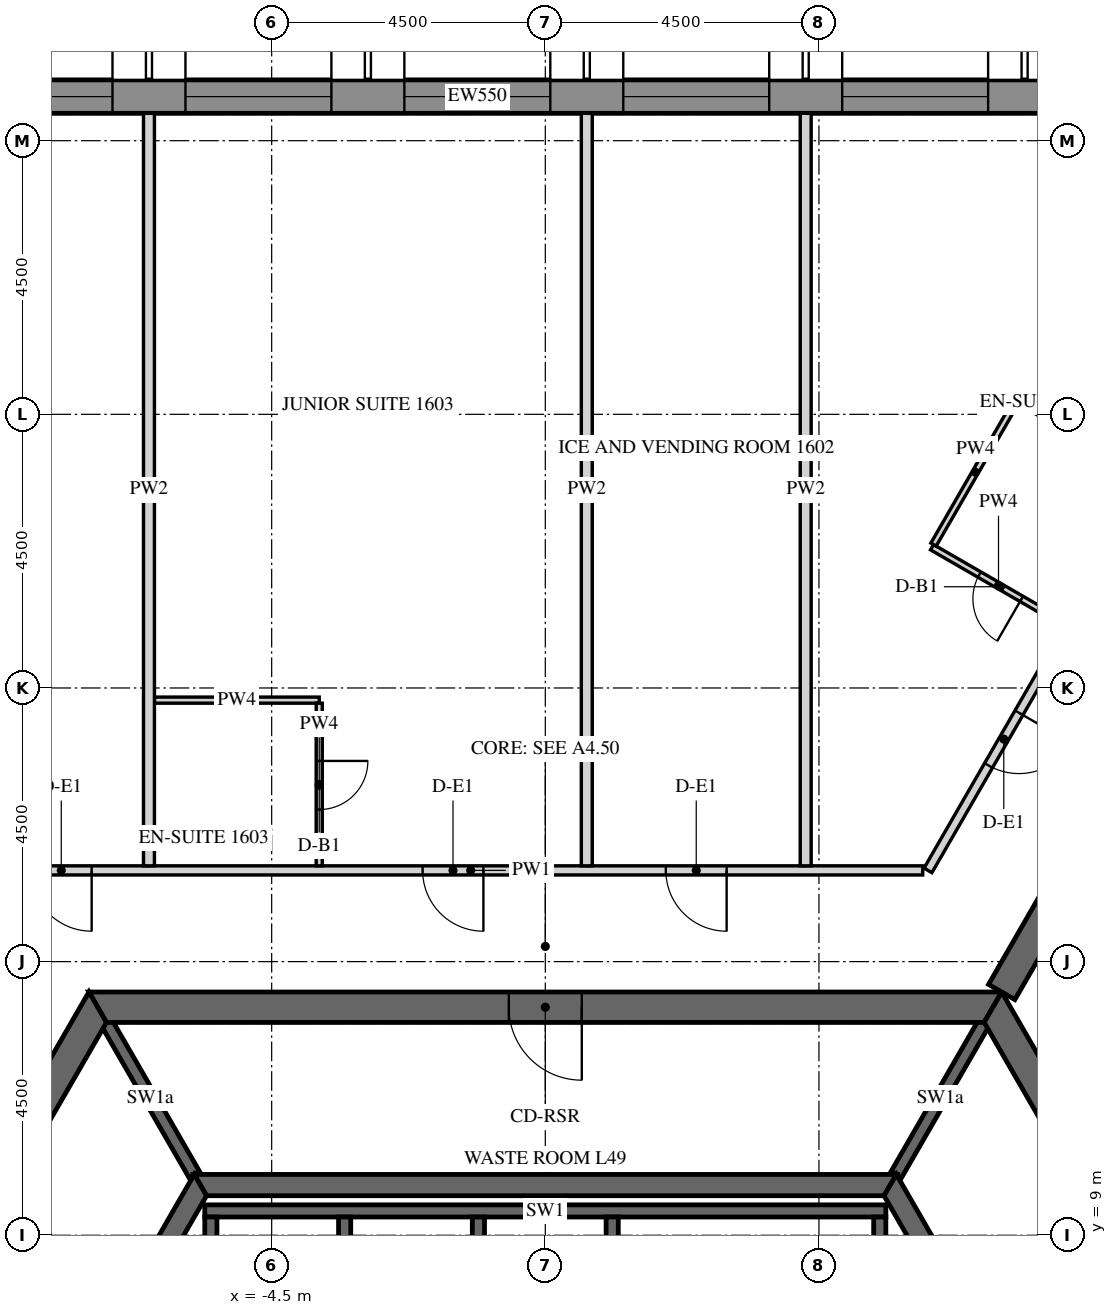
"""IFC4 building model, lengths in metres.
Left out: names, types, materials, properties, quantities, classifications, styles, units other than length and angle.
Written with IfcOpenShell. Run it as: python <this file> out.ifc"""

import sys

from ifc_helpers import new_model, si_unit, direction, frame, frame_2d, origin, place, context, subcontext, project, spatial, polyline, rectangle, outline, extrude, element, fill, save


model = new_model("IFC4")
c1 = context("Model", 3, precision=1e-05, world=origin(), true_north=direction((0.0, 1.0)))
c2 = subcontext(c1, "Body", "Model", "MODEL_VIEW")
j1 = project(units=[si_unit("LENGTHUNIT", "METRE"), si_unit("PLANEANGLEUNIT", "RADIAN")], contexts=[c1])
p1 = place(None, origin())
s1 = spatial("IfcSite", under=j1, at=p1, CompositionType="ELEMENT")
p2 = place(p1, origin())
s2 = spatial("IfcBuilding", under=s1, at=p2, CompositionType="ELEMENT")
p3 = place(p2, frame((0.0, 0.0, 207.3)))
s3 = spatial("IfcBuildingStorey", under=s2, at=p3, CompositionType="ELEMENT", Elevation=207.3)
p4 = place(p3, frame((12.761, 27.725, -0.15), z_axis=(0.0, 0.0, 1.0), x_axis=(-1.0, 0.0, 0.0)))
e1 = element("IfcWall", 1, at=p4, inside=s3, PredefinedType="SOLIDWALL", context=c2, shape_type="SweptSolid", body=[
    extrude(outline(polyline([(-0.022, -0.275), (27.783, -0.275), (27.732, 0.275), (0.022, 0.275), (-0.022, -0.275)])), origin(), (0.0, 0.0, 1.0), 3.9),
])
p5 = place(p4, frame((1.879, 0.0, 1.05)))
e2 = element("IfcOpeningElement", 2, at=p5, cuts=e1, PredefinedType="OPENING", context=c2, shape_type="SweptSolid", body=[
    extrude(rectangle(XDim=2.4, YDim=2.4, at=frame_2d((1.2, 1.2))), frame((0.0, 0.285, 0.0), z_axis=(0.0, -1.0, 0.0), x_axis=(1.0, 0.0, 0.0)), (0.0, 0.0, 1.0), 0.57),
])
p6 = place(p4, frame((5.479, 0.0, 1.05)))
e3 = element("IfcOpeningElement", 3, at=p6, cuts=e1, PredefinedType="OPENING", context=c2, shape_type="SweptSolid", body=[
    extrude(rectangle(XDim=2.4, YDim=2.4, at=frame_2d((1.2, 1.2))), frame((0.0, 0.285, 0.0), z_axis=(0.0, -1.0, 0.0), x_axis=(1.0, 0.0, 0.0)), (0.0, 0.0, 1.0), 0.57),
])
p7 = place(p4, frame((9.079, 0.0, 1.05)))
e4 = element("IfcOpeningElement", 4, at=p7, cuts=e1, PredefinedType="OPENING", context=c2, shape_type="SweptSolid", body=[
    extrude(rectangle(XDim=2.4, YDim=2.4, at=frame_2d((1.2, 1.2))), frame((0.0, 0.285, 0.0), z_axis=(0.0, -1.0, 0.0), x_axis=(1.0, 0.0, 0.0)), (0.0, 0.0, 1.0), 0.57),
])
p8 = place(p4, frame((12.679, 0.0, 1.05)))
e5 = element("IfcOpeningElement", 5, at=p8, cuts=e1, PredefinedType="OPENING", context=c2, shape_type="SweptSolid", body=[
    extrude(rectangle(XDim=2.4, YDim=2.4, at=frame_2d((1.2, 1.2))), frame((0.0, 0.285, 0.0), z_axis=(0.0, -1.0, 0.0), x_axis=(1.0, 0.0, 0.0)), (0.0, 0.0, 1.0), 0.57),
])
p9 = place(p4, frame((16.279, 0.0, 1.05)))
e6 = element("IfcOpeningElement", 6, at=p9, cuts=e1, PredefinedType="OPENING", context=c2, shape_type="SweptSolid", body=[
    extrude(rectangle(XDim=2.4, YDim=2.4, at=frame_2d((1.2, 1.2))), frame((0.0, 0.285, 0.0), z_axis=(0.0, -1.0, 0.0), x_axis=(1.0, 0.0, 0.0)), (0.0, 0.0, 1.0), 0.57),
])
p10 = place(p4, frame((19.879, 0.0, 1.05)))
e7 = element("IfcOpeningElement", 7, at=p10, cuts=e1, PredefinedType="OPENING", context=c2, shape_type="SweptSolid", body=[
    extrude(rectangle(XDim=2.4, YDim=2.4, at=frame_2d((1.2, 1.2))), frame((0.0, 0.285, 0.0), z_axis=(0.0, -1.0, 0.0), x_axis=(1.0, 0.0, 0.0)), (0.0, 0.0, 1.0), 0.57),
])
p11 = place(p4, frame((23.479, 0.0, 1.05)))
e8 = element("IfcOpeningElement", 8, at=p11, cuts=e1, PredefinedType="OPENING", context=c2, shape_type="SweptSolid", body=[
    extrude(rectangle(XDim=2.4, YDim=2.4, at=frame_2d((1.2, 1.2))), frame((0.0, 0.285, 0.0), z_axis=(0.0, -1.0, 0.0), x_axis=(1.0, 0.0, 0.0)), (0.0, 0.0, 1.0), 0.57),
])
p12 = place(p3, frame((-7.361, 12.75, -0.15), z_axis=(0.0, 0.0, 1.0), x_axis=(-0.50000571537, -0.866022103989, 0.0)))
e9 = element("IfcWall", 9, at=p12, inside=s3, PredefinedType="SHEAR", context=c2, shape_type="SweptSolid", body=[
    extrude(outline(polyline([(-0.144, -0.25), (14.867, -0.25), (14.578, 0.25), (0.144, 0.25), (-0.144, -0.25)])), origin(), (0.0, 0.0, 1.0), 3.9),
])
p13 = place(p12, frame((6.49, 0.0, 0.15)))
e10 = element("IfcOpeningElement", 10, at=p13, cuts=e9, PredefinedType="OPENING", context=c2, shape_type="SweptSolid", body=[
    extrude(rectangle(XDim=1.8, YDim=2.4, at=frame_2d((0.9, 1.2))), frame((0.0, 0.26, 0.0), z_axis=(0.0, -1.0, 0.0), x_axis=(1.0, 0.0, 0.0)), (0.0, 0.0, 1.0), 0.52),
])
p14 = place(p3, frame((14.722, 0.0, -0.15), z_axis=(0.0, 0.0, 1.0), x_axis=(-0.50000571537, 0.866022103989, 0.0)))
e11 = element("IfcWall", 11, at=p14, inside=s3, PredefinedType="SHEAR", context=c2, shape_type="SweptSolid", body=[
    extrude(outline(polyline([(-0.144, -0.25), (14.867, -0.25), (14.578, 0.25), (0.144, 0.25), (-0.144, -0.25)])), origin(), (0.0, 0.0, 1.0), 3.9),
])
p15 = place(p14, frame((6.432, 0.0, 0.15)))
e12 = element("IfcOpeningElement", 12, at=p15, cuts=e11, PredefinedType="OPENING", context=c2, shape_type="SweptSolid", body=[
    extrude(rectangle(XDim=1.8, YDim=2.4, at=frame_2d((0.9, 1.2))), frame((0.0, 0.26, 0.0), z_axis=(0.0, -1.0, 0.0), x_axis=(1.0, 0.0, 0.0)), (0.0, 0.0, 1.0), 0.52),
])
p16 = place(p3, frame((7.361, 12.75, -0.15), z_axis=(0.0, 0.0, 1.0), x_axis=(-1.0, 0.0, 0.0)))
e13 = element("IfcWall", 13, at=p16, inside=s3, PredefinedType="SHEAR", context=c2, shape_type="SweptSolid", body=[
    extrude(outline(polyline([(-0.144, -0.25), (14.866, -0.25), (14.578, 0.25), (0.144, 0.25), (-0.144, -0.25)])), origin(), (0.0, 0.0, 1.0), 3.9),
])
p17 = place(p16, frame((6.761, 0.0, 0.15)))
e14 = element("IfcOpeningElement", 14, at=p17, cuts=e13, PredefinedType="OPENING", context=c2, shape_type="SweptSolid", body=[
    extrude(rectangle(XDim=1.2, YDim=2.4, at=frame_2d((0.6, 1.2))), frame((0.0, 0.26, 0.0), z_axis=(0.0, -1.0, 0.0), x_axis=(1.0, 0.0, 0.0)), (0.0, 0.0, 1.0), 0.52),
])
p18 = place(p3, frame((7.506, 13.0, -0.15), z_axis=(0.0, 0.0, 1.0), x_axis=(0.499988271576, 0.866032175087, 0.0)))
e15 = element("IfcWall", 15, at=p18, inside=s3, PredefinedType="SHEAR", context=c2, shape_type="SweptSolid", body=[
    extrude(rectangle(XDim=15.424, YDim=0.5, at=frame_2d((7.712, 0.0))), origin(), (0.0, 0.0, 1.0), 3.9),
])
p19 = place(p18, frame((6.812, 0.0, 0.15)))
e16 = element("IfcOpeningElement", 16, at=p19, cuts=e15, PredefinedType="OPENING", context=c2, shape_type="SweptSolid", body=[
    extrude(rectangle(XDim=1.8, YDim=2.4, at=frame_2d((0.9, 1.2))), frame((0.0, 0.26, 0.0), z_axis=(0.0, -1.0, 0.0), x_axis=(1.0, 0.0, 0.0)), (0.0, 0.0, 1.0), 0.52),
])
p20 = place(p3, frame((-5.673, 9.825, -0.15), z_axis=(0.0, 0.0, 1.0), x_axis=(-0.499995046907, -0.866028263435, 0.0)))
e17 = element("IfcWall", 17, at=p20, inside=s3, PredefinedType="SHEAR", context=c2, shape_type="SweptSolid", body=[
    extrude(outline(polyline([(-0.101, -0.175), (11.446, -0.175), (11.244, 0.175), (0.101, 0.175), (-0.101, -0.175)])), origin(), (0.0, 0.0, 1.0), 3.9),
])
p21 = place(p20, frame((4.801, 0.0, 0.15)))
e18 = element("IfcOpeningElement", 18, at=p21, cuts=e17, PredefinedType="OPENING", context=c2, shape_type="SweptSolid", body=[
    extrude(rectangle(XDim=1.8, YDim=2.4, at=frame_2d((0.9, 1.2))), frame((0.0, 0.185, 0.0), z_axis=(0.0, -1.0, 0.0), x_axis=(1.0, 0.0, 0.0)), (0.0, 0.0, 1.0), 0.37),
])
p22 = place(p3, frame((11.345, 0.0, -0.15), z_axis=(0.0, 0.0, 1.0), x_axis=(-0.499995046907, 0.866028263435, 0.0)))
e19 = element("IfcWall", 19, at=p22, inside=s3, PredefinedType="SHEAR", context=c2, shape_type="SweptSolid", body=[
    extrude(outline(polyline([(-0.101, -0.175), (11.446, -0.175), (11.244, 0.175), (0.101, 0.175), (-0.101, -0.175)])), origin(), (0.0, 0.0, 1.0), 3.9),
])
p23 = place(p22, frame((4.744, 0.0, 0.15)))
e20 = element("IfcOpeningElement", 20, at=p23, cuts=e19, PredefinedType="OPENING", context=c2, shape_type="SweptSolid", body=[
    extrude(rectangle(XDim=1.8, YDim=2.4, at=frame_2d((0.9, 1.2))), frame((0.0, 0.185, 0.0), z_axis=(0.0, -1.0, 0.0), x_axis=(1.0, 0.0, 0.0)), (0.0, 0.0, 1.0), 0.37),
])
p24 = place(p3, frame((5.673, 9.825, -0.15), z_axis=(0.0, 0.0, 1.0), x_axis=(-1.0, 0.0, 0.0)))
e21 = element("IfcWall", 21, at=p24, inside=s3, PredefinedType="SHEAR", context=c2, shape_type="SweptSolid", body=[
    extrude(outline(polyline([(-0.101, -0.175), (11.446, -0.175), (11.244, 0.175), (0.101, 0.175), (-0.101, -0.175)])), origin(), (0.0, 0.0, 1.0), 3.9),
])
p25 = place(p3, frame((-5.6, 9.4, -0.25), z_axis=(0.0, 0.0, 1.0), x_axis=(1.0, 0.0, 0.0)))
e22 = element("IfcWall", 22, at=p25, inside=s3, PredefinedType="SHEAR", context=c2, shape_type="SweptSolid", body=[
    extrude(rectangle(XDim=11.2, YDim=0.2, at=frame_2d((5.6, 0.0))), origin(), (0.0, 0.0, 1.0), 3.9),
])
for number, where, z_axis, x_axis in (
    (23, (-5.5, 6.4, -0.25), (0.0, 0.0, 1.0), (0.0, 1.0, 0.0)),
    (24, (-3.3, 6.4, -0.25), (0.0, 0.0, 1.0), (0.0, 1.0, 0.0)),
    (25, (-1.1, 6.4, -0.25), (0.0, 0.0, 1.0), (0.0, 1.0, 0.0)),
    (26, (1.1, 6.4, -0.25), (0.0, 0.0, 1.0), (0.0, 1.0, 0.0)),
    (27, (5.5, 6.4, -0.25), (0.0, 0.0, 1.0), (0.0, 1.0, 0.0)),
):
    element("IfcWall", number, at=place(p3, frame(where, z_axis=z_axis, x_axis=x_axis)), inside=s3, PredefinedType="SHEAR", context=c2, shape_type="SweptSolid", body=[
        extrude(rectangle(XDim=2.9, YDim=0.2, at=frame_2d((1.45, 0.0))), origin(), (0.0, 0.0, 1.0), 3.9),
    ])
for number, where, z_axis, x_axis in (
    (28, (5.773, 10.0, -0.15), (0.0, 0.0, 1.0), (0.5, 0.866, 0.0)),
    (29, (-5.773, 10.0, -0.15), (0.0, 0.0, 1.0), (-0.5, 0.866, 0.0)),
):
    element("IfcWall", number, at=place(p3, frame(where, z_axis=z_axis, x_axis=x_axis)), inside=s3, PredefinedType="SHEAR", context=c2, shape_type="SweptSolid", body=[
        extrude(rectangle(XDim=2.887, YDim=0.2, at=frame_2d((1.443, 0.0))), origin(), (0.0, 0.0, 1.0), 3.9),
    ])
p26 = place(p3, frame((10.149, 21.678, 0.0), z_axis=(0.0, 0.0, 1.0), x_axis=(-0.499993780622, -0.866028994514, 0.0)))
e30 = element("IfcWall", 30, at=p26, inside=s3, PredefinedType="PARTITIONING", context=c2, shape_type="SweptSolid", body=[
    extrude(rectangle(XDim=7.711, YDim=0.15, at=frame_2d((3.855, 0.0))), origin(), (0.0, 0.0, 1.0), 2.988),
])
p27 = place(p26, frame((4.718, 0.0, 0.0)))
e31 = element("IfcOpeningElement", 31, at=p27, cuts=e30, PredefinedType="OPENING", context=c2, shape_type="SweptSolid", body=[
    extrude(rectangle(XDim=1.0, YDim=2.1, at=frame_2d((0.5, 1.05))), frame((0.0, 0.085, 0.0), z_axis=(0.0, -1.0, 0.0), x_axis=(1.0, 0.0, 0.0)), (0.0, 0.0, 1.0), 0.17),
])
p28 = place(p3, frame((6.207, 15.0, 0.0), z_axis=(0.0, 0.0, 1.0), x_axis=(-1.0, 0.0, 0.0)))
e32 = element("IfcWall", 32, at=p28, inside=s3, PredefinedType="PARTITIONING", context=c2, shape_type="SweptSolid", body=[
    extrude(rectangle(XDim=14.867, YDim=0.15, at=frame_2d((7.433, 0.0))), origin(), (0.0, 0.0, 1.0), 2.988),
])
p29 = place(p28, frame((3.224, 0.0, 0.0)))
e33 = element("IfcOpeningElement", 33, at=p29, cuts=e32, PredefinedType="OPENING", context=c2, shape_type="SweptSolid", body=[
    extrude(rectangle(XDim=1.0, YDim=2.1, at=frame_2d((0.5, 1.05))), frame((0.0, 0.085, 0.0), z_axis=(0.0, -1.0, 0.0), x_axis=(1.0, 0.0, 0.0)), (0.0, 0.0, 1.0), 0.17),
])
p30 = place(p28, frame((7.224, 0.0, 0.0)))
e34 = element("IfcOpeningElement", 34, at=p30, cuts=e32, PredefinedType="OPENING", context=c2, shape_type="SweptSolid", body=[
    extrude(rectangle(XDim=1.0, YDim=2.1, at=frame_2d((0.5, 1.05))), frame((0.0, 0.085, 0.0), z_axis=(0.0, -1.0, 0.0), x_axis=(1.0, 0.0, 0.0)), (0.0, 0.0, 1.0), 0.17),
])
p31 = place(p28, frame((13.667, 0.0, 0.0)))
e35 = element("IfcOpeningElement", 35, at=p31, cuts=e32, PredefinedType="OPENING", context=c2, shape_type="SweptSolid", body=[
    extrude(rectangle(XDim=1.0, YDim=2.1, at=frame_2d((0.5, 1.05))), frame((0.0, 0.085, 0.0), z_axis=(0.0, -1.0, 0.0), x_axis=(1.0, 0.0, 0.0)), (0.0, 0.0, 1.0), 0.17),
])
p32 = place(p3, frame((8.546, 19.052, 0.0), z_axis=(0.0, 0.0, 1.0), x_axis=(-0.866039067339, 0.499976333282, 0.0)))
e36 = element("IfcWall", 36, at=p32, inside=s3, PredefinedType="PARTITIONING", context=c2, shape_type="SweptSolid", body=[
    extrude(rectangle(XDim=2.525, YDim=0.1, at=frame_2d((1.262, 0.0))), origin(), (0.0, 0.0, 1.0), 2.988),
])
p33 = place(p32, frame((0.825, 0.0, 0.0)))
e37 = element("IfcOpeningElement", 37, at=p33, cuts=e36, PredefinedType="OPENING", context=c2, shape_type="SweptSolid", body=[
    extrude(rectangle(XDim=0.8, YDim=2.1, at=frame_2d((0.4, 1.05))), frame((0.0, 0.06, 0.0), z_axis=(0.0, -1.0, 0.0), x_axis=(1.0, 0.0, 0.0)), (0.0, 0.0, 1.0), 0.12),
])
p34 = place(p3, frame((6.385, 20.358, 0.0), z_axis=(0.0, 0.0, 1.0), x_axis=(0.499996545922, 0.866027397988, 0.0)))
e38 = element("IfcWall", 38, at=p34, inside=s3, PredefinedType="PARTITIONING", context=c2, shape_type="SweptSolid", body=[
    extrude(rectangle(XDim=2.75, YDim=0.1, at=frame_2d((1.375, 0.0))), origin(), (0.0, 0.0, 1.0), 2.988),
])
p35 = place(p3, frame((7.803, 22.715, 0.0), z_axis=(0.0, 0.0, 1.0), x_axis=(0.866006523861, -0.500032699561, 0.0)))
e39 = element("IfcWall", 39, at=p35, inside=s3, PredefinedType="PARTITIONING", context=c2, shape_type="SweptSolid", body=[
    extrude(rectangle(XDim=2.475, YDim=0.1, at=frame_2d((1.237, 0.0))), origin(), (0.0, 0.0, 1.0), 2.988),
])
for number, where, z_axis, x_axis in (
    (40, (4.282, 27.45, 0.0), (0.0, 0.0, 1.0), (0.0, -1.0, 0.0)),
    (41, (0.682, 27.45, 0.0), (0.0, 0.0, 1.0), (0.0, -1.0, 0.0)),
):
    element("IfcWall", number, at=place(p3, frame(where, z_axis=z_axis, x_axis=x_axis)), inside=s3, PredefinedType="PARTITIONING", context=c2, shape_type="SweptSolid", body=[
        extrude(rectangle(XDim=12.375, YDim=0.18, at=frame_2d((6.188, 0.0))), origin(), (0.0, 0.0, 1.0), 2.988),
    ])
p36 = place(p3, frame((-6.428, 17.8, 0.0), z_axis=(0.0, 0.0, 1.0), x_axis=(1.0, 0.0, 0.0)))
e42 = element("IfcWall", 42, at=p36, inside=s3, PredefinedType="PARTITIONING", context=c2, shape_type="SweptSolid", body=[
    extrude(rectangle(XDim=2.71, YDim=0.1, at=frame_2d((1.355, 0.0))), origin(), (0.0, 0.0, 1.0), 2.988),
])
p37 = place(p3, frame((-3.718, 17.75, 0.0), z_axis=(0.0, 0.0, 1.0), x_axis=(0.0, -1.0, 0.0)))
e43 = element("IfcWall", 43, at=p37, inside=s3, PredefinedType="PARTITIONING", context=c2, shape_type="SweptSolid", body=[
    extrude(rectangle(XDim=2.675, YDim=0.1, at=frame_2d((1.337, 0.0))), origin(), (0.0, 0.0, 1.0), 2.988),
])
p38 = place(p37, frame((0.95, 0.0, 0.0)))
e44 = element("IfcOpeningElement", 44, at=p38, cuts=e43, PredefinedType="OPENING", context=c2, shape_type="SweptSolid", body=[
    extrude(rectangle(XDim=0.8, YDim=2.1, at=frame_2d((0.4, 1.05))), frame((0.0, 0.06, 0.0), z_axis=(0.0, -1.0, 0.0), x_axis=(1.0, 0.0, 0.0)), (0.0, 0.0, 1.0), 0.12),
])
p39 = place(p3, frame((-6.518, 27.45, 0.0), z_axis=(0.0, 0.0, 1.0), x_axis=(0.0, -1.0, 0.0)))
e45 = element("IfcWall", 45, at=p39, inside=s3, PredefinedType="PARTITIONING", context=c2, shape_type="SweptSolid", body=[
    extrude(rectangle(XDim=12.375, YDim=0.18, at=frame_2d((6.188, 0.0))), origin(), (0.0, 0.0, 1.0), 2.988),
])
p40 = place(p6, frame((0.0, 0.205, 0.0)))
e46 = element("IfcWindow", 46, at=p40, inside=s3, PartitioningType="DOUBLE_PANEL_VERTICAL", PredefinedType="WINDOW", context=c2, shape_type="SweptSolid", body=[
    extrude(rectangle(XDim=2.4, YDim=2.4, at=frame_2d((1.2, 1.2))), frame((0.0, 0.03, 0.0), z_axis=(0.0, -1.0, 0.0), x_axis=(1.0, 0.0, 0.0)), (0.0, 0.0, 1.0), 0.06),
])
fill(e3, e46)
p41 = place(p7, frame((0.0, 0.205, 0.0)))
e47 = element("IfcWindow", 47, at=p41, inside=s3, PartitioningType="DOUBLE_PANEL_VERTICAL", PredefinedType="WINDOW", context=c2, shape_type="SweptSolid", body=[
    extrude(rectangle(XDim=2.4, YDim=2.4, at=frame_2d((1.2, 1.2))), frame((0.0, 0.03, 0.0), z_axis=(0.0, -1.0, 0.0), x_axis=(1.0, 0.0, 0.0)), (0.0, 0.0, 1.0), 0.06),
])
fill(e4, e47)
p42 = place(p8, frame((0.0, 0.205, 0.0)))
e48 = element("IfcWindow", 48, at=p42, inside=s3, PartitioningType="DOUBLE_PANEL_VERTICAL", PredefinedType="WINDOW", context=c2, shape_type="SweptSolid", body=[
    extrude(rectangle(XDim=2.4, YDim=2.4, at=frame_2d((1.2, 1.2))), frame((0.0, 0.03, 0.0), z_axis=(0.0, -1.0, 0.0), x_axis=(1.0, 0.0, 0.0)), (0.0, 0.0, 1.0), 0.06),
])
fill(e5, e48)
p43 = place(p9, frame((0.0, 0.205, 0.0)))
e49 = element("IfcWindow", 49, at=p43, inside=s3, PartitioningType="DOUBLE_PANEL_VERTICAL", PredefinedType="WINDOW", context=c2, shape_type="SweptSolid", body=[
    extrude(rectangle(XDim=2.4, YDim=2.4, at=frame_2d((1.2, 1.2))), frame((0.0, 0.03, 0.0), z_axis=(0.0, -1.0, 0.0), x_axis=(1.0, 0.0, 0.0)), (0.0, 0.0, 1.0), 0.06),
])
fill(e6, e49)
p44 = place(p10, frame((0.0, 0.205, 0.0)))
e50 = element("IfcWindow", 50, at=p44, inside=s3, PartitioningType="DOUBLE_PANEL_VERTICAL", PredefinedType="WINDOW", context=c2, shape_type="SweptSolid", body=[
    extrude(rectangle(XDim=2.4, YDim=2.4, at=frame_2d((1.2, 1.2))), frame((0.0, 0.03, 0.0), z_axis=(0.0, -1.0, 0.0), x_axis=(1.0, 0.0, 0.0)), (0.0, 0.0, 1.0), 0.06),
])
fill(e7, e50)
p45 = place(p17, origin())
e51 = element("IfcDoor", 51, at=p45, inside=s3, OperationType="SINGLE_SWING_LEFT", PredefinedType="DOOR", context=c2, shape_type="SweptSolid", body=[
    extrude(rectangle(XDim=1.2, YDim=2.4, at=frame_2d((0.6, 1.2))), frame((0.0, 0.025, 0.0), z_axis=(0.0, -1.0, 0.0), x_axis=(1.0, 0.0, 0.0)), (0.0, 0.0, 1.0), 0.05),
])
fill(e14, e51)
p46 = place(p27, origin())
e52 = element("IfcDoor", 52, at=p46, inside=s3, OperationType="SINGLE_SWING_LEFT", PredefinedType="DOOR", context=c2, shape_type="SweptSolid", body=[
    extrude(rectangle(XDim=1.0, YDim=2.1, at=frame_2d((0.5, 1.05))), frame((0.0, 0.025, 0.0), z_axis=(0.0, -1.0, 0.0), x_axis=(1.0, 0.0, 0.0)), (0.0, 0.0, 1.0), 0.05),
])
fill(e31, e52)
p47 = place(p33, origin())
e53 = element("IfcDoor", 53, at=p47, inside=s3, OperationType="SINGLE_SWING_RIGHT", PredefinedType="DOOR", context=c2, shape_type="SweptSolid", body=[
    extrude(rectangle(XDim=0.8, YDim=2.1, at=frame_2d((0.4, 1.05))), frame((0.0, 0.025, 0.0), z_axis=(0.0, -1.0, 0.0), x_axis=(1.0, 0.0, 0.0)), (0.0, 0.0, 1.0), 0.05),
])
fill(e37, e53)
p48 = place(p29, origin())
e54 = element("IfcDoor", 54, at=p48, inside=s3, OperationType="SINGLE_SWING_RIGHT", PredefinedType="DOOR", context=c2, shape_type="SweptSolid", body=[
    extrude(rectangle(XDim=1.0, YDim=2.1, at=frame_2d((0.5, 1.05))), frame((0.0, 0.025, 0.0), z_axis=(0.0, -1.0, 0.0), x_axis=(1.0, 0.0, 0.0)), (0.0, 0.0, 1.0), 0.05),
])
fill(e33, e54)
p49 = place(p30, origin())
e55 = element("IfcDoor", 55, at=p49, inside=s3, OperationType="SINGLE_SWING_RIGHT", PredefinedType="DOOR", context=c2, shape_type="SweptSolid", body=[
    extrude(rectangle(XDim=1.0, YDim=2.1, at=frame_2d((0.5, 1.05))), frame((0.0, 0.025, 0.0), z_axis=(0.0, -1.0, 0.0), x_axis=(1.0, 0.0, 0.0)), (0.0, 0.0, 1.0), 0.05),
])
fill(e34, e55)
p50 = place(p38, origin())
e56 = element("IfcDoor", 56, at=p50, inside=s3, OperationType="SINGLE_SWING_LEFT", PredefinedType="DOOR", context=c2, shape_type="SweptSolid", body=[
    extrude(rectangle(XDim=0.8, YDim=2.1, at=frame_2d((0.4, 1.05))), frame((0.0, 0.025, 0.0), z_axis=(0.0, -1.0, 0.0), x_axis=(1.0, 0.0, 0.0)), (0.0, 0.0, 1.0), 0.05),
])
fill(e44, e56)
p51 = place(p31, origin())
e57 = element("IfcDoor", 57, at=p51, inside=s3, OperationType="SINGLE_SWING_LEFT", PredefinedType="DOOR", context=c2, shape_type="SweptSolid", body=[
    extrude(rectangle(XDim=1.0, YDim=2.1, at=frame_2d((0.5, 1.05))), frame((0.0, 0.025, 0.0), z_axis=(0.0, -1.0, 0.0), x_axis=(1.0, 0.0, 0.0)), (0.0, 0.0, 1.0), 0.05),
])
fill(e35, e57)
save(model, sys.argv[1])
